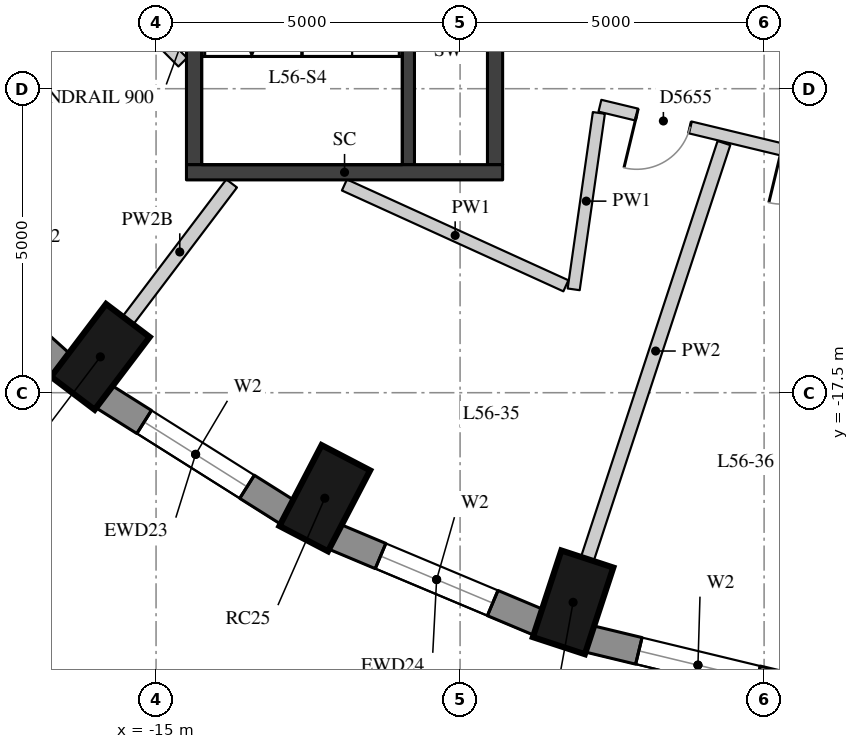
"""IFC4 building model, lengths in metres.
Left out: names, types, materials, properties, quantities, classifications, styles, units other than length and angle.
Written with IfcOpenShell. Run it as: python <this file> out.ifc"""

import sys

from ifc_helpers import new_model, si_unit, direction, frame, frame_2d, origin, origin_2d, place, context, subcontext, project, spatial, rectangle, extrude, element, fill, save


model = new_model("IFC4")
c1 = context("Model", 3, precision=1e-05, world=origin(), true_north=direction((0.0, 1.0)))
c2 = subcontext(c1, "Body", "Model", "MODEL_VIEW")
j1 = project(units=[si_unit("LENGTHUNIT", "METRE"), si_unit("PLANEANGLEUNIT", "RADIAN")], contexts=[c1])
p1 = place(None, origin())
s1 = spatial("IfcSite", under=j1, at=p1, CompositionType="ELEMENT")
p2 = place(p1, origin())
s2 = spatial("IfcBuilding", under=s1, at=p2, CompositionType="ELEMENT")
p3 = place(p2, frame((0.0, 0.0, 199.1)))
s3 = spatial("IfcBuildingStorey", under=s2, at=p3, CompositionType="ELEMENT", Elevation=199.1)
for number, where, z_axis, x_axis in (
    (1, (-15.916, -16.911, 0.0), (0.0, 0.0, 1.0), (-0.604, -0.797, 0.0)),
    (2, (-12.225, -19.235, 0.0), (0.0, 0.0, 1.0), (-0.462, -0.887, 0.0)),
    (3, (-8.141, -20.948, 0.0), (0.0, 0.0, 1.0), (-0.312, -0.95, 0.0)),
):
    element("IfcColumn", number, at=place(p3, frame(where, z_axis=z_axis, x_axis=x_axis)), inside=s3, PredefinedType="COLUMN", context=c2, shape_type="SweptSolid", body=[
        extrude(rectangle(XDim=1.5, YDim=0.9, at=origin_2d()), origin(), (0.0, 0.0, 1.0), 3.3),
    ])
p4 = place(p3, frame((-19.165, -14.69, 0.0), z_axis=(0.0, 0.0, 1.0), x_axis=(0.743442727602, -0.668799604348, 0.0)))
e4 = element("IfcWall", 4, at=p4, inside=s3, PredefinedType="SOLIDWALL", context=c2, shape_type="SweptSolid", body=[
    extrude(rectangle(XDim=3.513, YDim=0.45, at=frame_2d((1.756, 0.0))), origin(), (0.0, 0.0, 1.0), 3.02),
])
p5 = place(p4, frame((0.756, 0.0, 0.4)))
e5 = element("IfcOpeningElement", 5, at=p5, cuts=e4, PredefinedType="OPENING", context=c2, shape_type="SweptSolid", body=[
    extrude(rectangle(XDim=2.0, YDim=1.75, at=frame_2d((1.0, 0.875))), frame((0.0, 0.235, 0.0), z_axis=(0.0, -1.0, 0.0), x_axis=(1.0, 0.0, 0.0)), (0.0, 0.0, 1.0), 0.47),
])
p6 = place(p3, frame((-15.867, -17.559, 0.0), z_axis=(0.0, 0.0, 1.0), x_axis=(0.84616917791, -0.532914366813, 0.0)))
e6 = element("IfcWall", 6, at=p6, inside=s3, PredefinedType="SOLIDWALL", context=c2, shape_type="SweptSolid", body=[
    extrude(rectangle(XDim=3.587, YDim=0.45, at=frame_2d((1.793, 0.0))), origin(), (0.0, 0.0, 1.0), 3.02),
])
p7 = place(p6, frame((0.793, 0.0, 0.4)))
e7 = element("IfcOpeningElement", 7, at=p7, cuts=e6, PredefinedType="OPENING", context=c2, shape_type="SweptSolid", body=[
    extrude(rectangle(XDim=2.0, YDim=1.75, at=frame_2d((1.0, 0.875))), frame((0.0, 0.235, 0.0), z_axis=(0.0, -1.0, 0.0), x_axis=(1.0, 0.0, 0.0)), (0.0, 0.0, 1.0), 0.47),
])
p8 = place(p3, frame((-12.069, -19.867, 0.0), z_axis=(0.0, 0.0, 1.0), x_axis=(0.922168222612, -0.386789050006, 0.0)))
e8 = element("IfcWall", 8, at=p8, inside=s3, PredefinedType="SOLIDWALL", context=c2, shape_type="SweptSolid", body=[
    extrude(rectangle(XDim=3.651, YDim=0.45, at=frame_2d((1.825, 0.0))), origin(), (0.0, 0.0, 1.0), 3.02),
])
p9 = place(p8, frame((0.825, 0.0, 0.4)))
e9 = element("IfcOpeningElement", 9, at=p9, cuts=e8, PredefinedType="OPENING", context=c2, shape_type="SweptSolid", body=[
    extrude(rectangle(XDim=2.0, YDim=1.75, at=frame_2d((1.0, 0.875))), frame((0.0, 0.235, 0.0), z_axis=(0.0, -1.0, 0.0), x_axis=(1.0, 0.0, 0.0)), (0.0, 0.0, 1.0), 0.47),
])
p10 = place(p3, frame((-7.885, -21.547, 0.0), z_axis=(0.0, 0.0, 1.0), x_axis=(0.9721584944, -0.234324266275, 0.0)))
e10 = element("IfcWall", 10, at=p10, inside=s3, PredefinedType="SOLIDWALL", context=c2, shape_type="SweptSolid", body=[
    extrude(rectangle(XDim=3.698, YDim=0.45, at=frame_2d((1.849, 0.0))), origin(), (0.0, 0.0, 1.0), 3.02),
])
p11 = place(p10, frame((0.849, 0.0, 0.4)))
e11 = element("IfcOpeningElement", 11, at=p11, cuts=e10, PredefinedType="OPENING", context=c2, shape_type="SweptSolid", body=[
    extrude(rectangle(XDim=2.0, YDim=1.75, at=frame_2d((1.0, 0.875))), frame((0.0, 0.235, 0.0), z_axis=(0.0, -1.0, 0.0), x_axis=(1.0, 0.0, 0.0)), (0.0, 0.0, 1.0), 0.47),
])
p12 = place(p3, frame((-10.85, -13.75, 0.0), z_axis=(0.0, 0.0, 1.0), x_axis=(0.0, 1.0, 0.0)))
e12 = element("IfcWall", 12, at=p12, inside=s3, PredefinedType="SHEAR", context=c2, shape_type="SweptSolid", body=[
    extrude(rectangle(XDim=6.0, YDim=0.2, at=frame_2d((3.0, 0.0))), origin(), (0.0, 0.0, 1.0), 3.02),
])
p13 = place(p12, frame((4.4, 0.0, 0.0)))
e13 = element("IfcOpeningElement", 13, at=p13, cuts=e12, PredefinedType="OPENING", context=c2, shape_type="SweptSolid", body=[
    extrude(rectangle(XDim=1.5, YDim=2.1, at=frame_2d((0.75, 1.05))), frame((0.0, 0.11, 0.0), z_axis=(0.0, -1.0, 0.0), x_axis=(1.0, 0.0, 0.0)), (0.0, 0.0, 1.0), 0.22),
])
p14 = place(p3, frame((-14.375, -13.75, -0.28), z_axis=(0.0, 0.0, 1.0), x_axis=(0.0, 1.0, 0.0)))
e14 = element("IfcWall", 14, at=p14, inside=s3, PredefinedType="SHEAR", context=c2, shape_type="SweptSolid", body=[
    extrude(rectangle(XDim=6.0, YDim=0.25, at=frame_2d((3.0, 0.0))), origin(), (0.0, 0.0, 1.0), 3.3),
])
p15 = place(p3, frame((-9.425, -13.75, -0.28), z_axis=(0.0, 0.0, 1.0), x_axis=(0.0, 1.0, 0.0)))
e15 = element("IfcWall", 15, at=p15, inside=s3, PredefinedType="SHEAR", context=c2, shape_type="SweptSolid", body=[
    extrude(rectangle(XDim=6.0, YDim=0.25, at=frame_2d((3.0, 0.0))), origin(), (0.0, 0.0, 1.0), 3.3),
])
p16 = place(p15, frame((2.4, 0.0, 0.28)))
e16 = element("IfcOpeningElement", 16, at=p16, cuts=e15, PredefinedType="OPENING", context=c2, shape_type="SweptSolid", body=[
    extrude(rectangle(XDim=1.5, YDim=2.1, at=frame_2d((0.75, 1.05))), frame((0.0, 0.135, 0.0), z_axis=(0.0, -1.0, 0.0), x_axis=(1.0, 0.0, 0.0)), (0.0, 0.0, 1.0), 0.27),
])
p17 = place(p3, frame((-14.5, -13.875, -0.28), z_axis=(0.0, 0.0, 1.0), x_axis=(1.0, 0.0, 0.0)))
e17 = element("IfcWall", 17, at=p17, inside=s3, PredefinedType="SHEAR", context=c2, shape_type="SweptSolid", body=[
    extrude(rectangle(XDim=5.2, YDim=0.25, at=frame_2d((2.6, 0.0))), origin(), (0.0, 0.0, 1.0), 3.3),
])
p18 = place(p3, frame((0.602, -14.777, 0.0), z_axis=(0.0, 0.0, 1.0), x_axis=(-0.972266752798, 0.23387467029, 0.0)))
e18 = element("IfcWall", 18, at=p18, inside=s3, PredefinedType="PARTITIONING", context=c2, shape_type="SweptSolid", body=[
    extrude(rectangle(XDim=8.539, YDim=0.2, at=frame_2d((4.27, 0.0))), origin(), (0.0, 0.0, 1.0), 2.42),
])
p19 = place(p18, frame((7.016, 0.0, 0.0)))
e19 = element("IfcOpeningElement", 19, at=p19, cuts=e18, PredefinedType="OPENING", context=c2, shape_type="SweptSolid", body=[
    extrude(rectangle(XDim=0.9, YDim=2.1, at=frame_2d((0.45, 1.05))), frame((0.0, 0.11, 0.0), z_axis=(0.0, -1.0, 0.0), x_axis=(1.0, 0.0, 0.0)), (0.0, 0.0, 1.0), 0.22),
])
p20 = place(p18, frame((4.565, 0.0, 0.0)))
e20 = element("IfcOpeningElement", 20, at=p20, cuts=e18, PredefinedType="OPENING", context=c2, shape_type="SweptSolid", body=[
    extrude(rectangle(XDim=0.9, YDim=2.1, at=frame_2d((0.45, 1.05))), frame((0.0, 0.11, 0.0), z_axis=(0.0, -1.0, 0.0), x_axis=(1.0, 0.0, 0.0)), (0.0, 0.0, 1.0), 0.22),
])
p21 = place(p18, frame((1.78, 0.0, 0.0)))
e21 = element("IfcOpeningElement", 21, at=p21, cuts=e18, PredefinedType="OPENING", context=c2, shape_type="SweptSolid", body=[
    extrude(rectangle(XDim=0.9, YDim=2.1, at=frame_2d((0.45, 1.05))), frame((0.0, 0.11, 0.0), z_axis=(0.0, -1.0, 0.0), x_axis=(1.0, 0.0, 0.0)), (0.0, 0.0, 1.0), 0.22),
])
p22 = place(p3, frame((-7.718, -12.898, 0.0), z_axis=(0.0, 0.0, 1.0), x_axis=(-0.141269756138, -0.989971138974, 0.0)))
e22 = element("IfcWall", 22, at=p22, inside=s3, PredefinedType="PARTITIONING", context=c2, shape_type="SweptSolid", body=[
    extrude(rectangle(XDim=2.931, YDim=0.2, at=frame_2d((1.465, 0.0))), origin(), (0.0, 0.0, 1.0), 3.02),
])
p23 = place(p3, frame((-8.26, -15.742, 0.0), z_axis=(0.0, 0.0, 1.0), x_axis=(-0.910075871217, 0.414441683025, 0.0)))
e23 = element("IfcWall", 23, at=p23, inside=s3, PredefinedType="PARTITIONING", context=c2, shape_type="SweptSolid", body=[
    extrude(rectangle(XDim=4.002, YDim=0.2, at=frame_2d((2.001, 0.0))), origin(), (0.0, 0.0, 1.0), 3.02),
])
p24 = place(p3, frame((-14.562, -12.064, 0.0), z_axis=(0.0, 0.0, 1.0), x_axis=(-0.704826289083, 0.709379942074, 0.0)))
e24 = element("IfcWall", 24, at=p24, inside=s3, PredefinedType="PARTITIONING", context=c2, shape_type="SweptSolid", body=[
    extrude(rectangle(XDim=2.466, YDim=0.2, at=frame_2d((1.233, 0.0))), origin(), (0.0, 0.0, 1.0), 3.02),
])
p25 = place(p3, frame((-15.463, -16.312, 0.0), z_axis=(0.0, 0.0, 1.0), x_axis=(0.603613294085, 0.797277236101, 0.0)))
e25 = element("IfcWall", 25, at=p25, inside=s3, PredefinedType="PARTITIONING", context=c2, shape_type="SweptSolid", body=[
    extrude(rectangle(XDim=2.828, YDim=0.22, at=frame_2d((1.414, 0.0))), origin(), (0.0, 0.0, 1.0), 2.57),
])
p26 = place(p3, frame((-7.907, -20.235, 0.0), z_axis=(0.0, 0.0, 1.0), x_axis=(0.312013837279, 0.950077557543, 0.0)))
e26 = element("IfcWall", 26, at=p26, inside=s3, PredefinedType="PARTITIONING", context=c2, shape_type="SweptSolid", body=[
    extrude(rectangle(XDim=7.201, YDim=0.22, at=frame_2d((3.601, 0.0))), origin(), (0.0, 0.0, 1.0), 3.02),
])
p27 = place(p7, origin())
e27 = element("IfcWindow", 27, at=p27, inside=s3, PartitioningType="SINGLE_PANEL", PredefinedType="WINDOW", context=c2, shape_type="SweptSolid", body=[
    extrude(rectangle(XDim=2.0, YDim=1.75, at=frame_2d((1.0, 0.875))), frame((0.0, 0.035, 0.0), z_axis=(0.0, -1.0, 0.0), x_axis=(1.0, 0.0, 0.0)), (0.0, 0.0, 1.0), 0.06),
])
fill(e7, e27)
p28 = place(p9, origin())
e28 = element("IfcWindow", 28, at=p28, inside=s3, PartitioningType="SINGLE_PANEL", PredefinedType="WINDOW", context=c2, shape_type="SweptSolid", body=[
    extrude(rectangle(XDim=2.0, YDim=1.75, at=frame_2d((1.0, 0.875))), frame((0.0, 0.035, 0.0), z_axis=(0.0, -1.0, 0.0), x_axis=(1.0, 0.0, 0.0)), (0.0, 0.0, 1.0), 0.06),
])
fill(e9, e28)
p29 = place(p11, origin())
e29 = element("IfcWindow", 29, at=p29, inside=s3, PartitioningType="SINGLE_PANEL", PredefinedType="WINDOW", context=c2, shape_type="SweptSolid", body=[
    extrude(rectangle(XDim=2.0, YDim=1.75, at=frame_2d((1.0, 0.875))), frame((0.0, 0.035, 0.0), z_axis=(0.0, -1.0, 0.0), x_axis=(1.0, 0.0, 0.0)), (0.0, 0.0, 1.0), 0.06),
])
fill(e11, e29)
p30 = place(p19, origin())
e30 = element("IfcDoor", 30, at=p30, inside=s3, OperationType="SINGLE_SWING_RIGHT", PredefinedType="DOOR", context=c2, shape_type="SweptSolid", body=[
    extrude(rectangle(XDim=0.9, YDim=2.1, at=frame_2d((0.45, 1.05))), frame((0.0, 0.025, 0.0), z_axis=(0.0, -1.0, 0.0), x_axis=(1.0, 0.0, 0.0)), (0.0, 0.0, 1.0), 0.05),
])
fill(e19, e30)
save(model, sys.argv[1])
